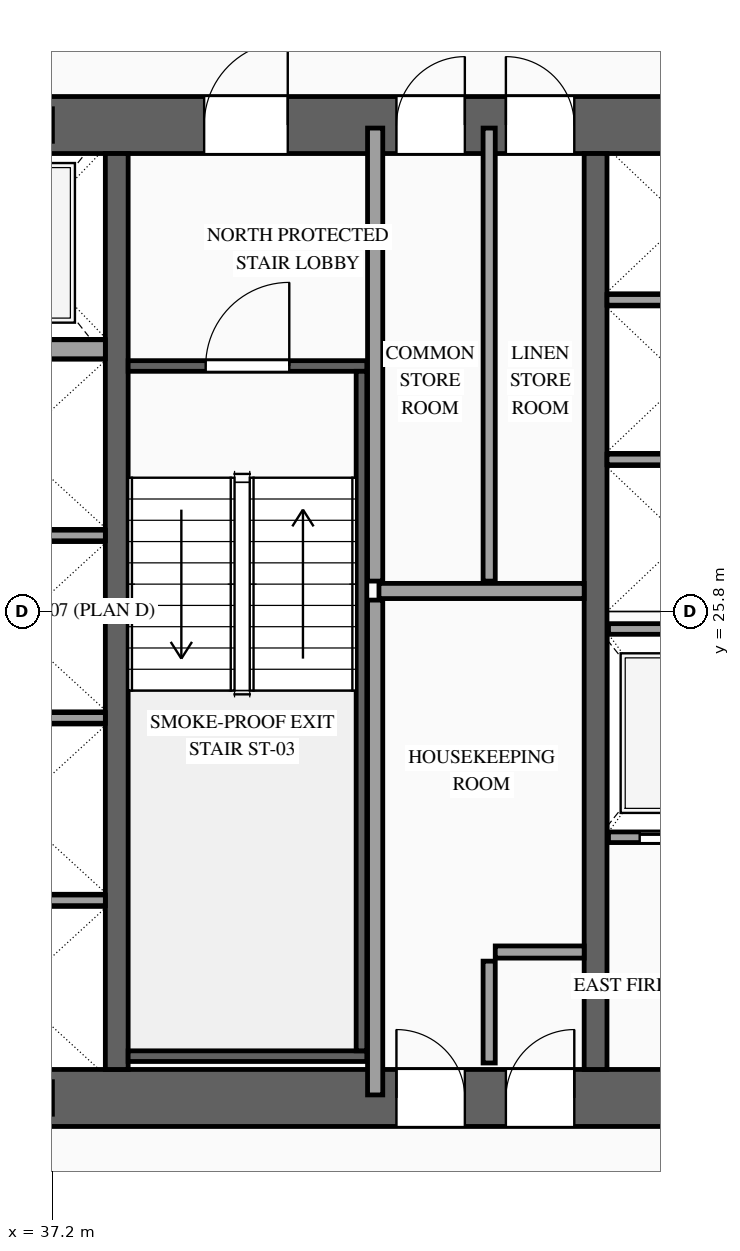
"""IFC4 building model, lengths in metres.
Left out: names, types, materials, properties, quantities, classifications, styles, units other than length and angle.
Written with IfcOpenShell. Run it as: python <this file> out.ifc"""

import sys

from ifc_helpers import new_model, si_unit, direction, frame, frame_2d, origin, origin_2d, place, context, subcontext, project, spatial, rectangle, i_section, extrude, source, transform, mapped, element, fill, save


model = new_model("IFC4")
c1 = context("Model", 3, precision=1e-05, world=origin(), true_north=direction((0.0, 1.0)))
c2 = subcontext(c1, "Body", "Model", "MODEL_VIEW")
j1 = project(units=[si_unit("LENGTHUNIT", "METRE"), si_unit("PLANEANGLEUNIT", "RADIAN")], contexts=[c1])
p1 = place(None, origin())
s1 = spatial("IfcSite", under=j1, at=p1, CompositionType="ELEMENT")
p2 = place(p1, origin())
s2 = spatial("IfcBuilding", under=s1, at=p2, CompositionType="ELEMENT")
p3 = place(p2, frame((0.0, 0.0, 111.8)))
s3 = spatial("IfcBuildingStorey", under=s2, at=p3, CompositionType="ELEMENT", Elevation=111.8)
p4 = place(p3, frame((23.425, 19.4, 0.0), z_axis=(0.0, 0.0, 1.0), x_axis=(1.0, 0.0, 0.0)))
e1 = element("IfcWall", 1, at=p4, inside=s3, PredefinedType="SHEAR", context=c2, shape_type="SweptSolid", body=[
    extrude(rectangle(XDim=27.15, YDim=0.75, at=frame_2d((13.575, 0.0))), origin(), (0.0, 0.0, 1.0), 3.6),
])
p5 = place(p4, frame((2.025, 0.0, 0.0)))
e2 = element("IfcOpeningElement", 2, at=p5, cuts=e1, PredefinedType="OPENING", context=c2, shape_type="SweptSolid", body=[
    extrude(rectangle(XDim=1.1, YDim=2.2, at=frame_2d((0.55, 1.1))), frame((0.0, 0.39, 0.0), z_axis=(0.0, -1.0, 0.0), x_axis=(1.0, 0.0, 0.0)), (0.0, 0.0, 1.0), 0.78),
])
p6 = place(p4, frame((9.925, 0.0, 0.0)))
e3 = element("IfcOpeningElement", 3, at=p6, cuts=e1, PredefinedType="OPENING", context=c2, shape_type="SweptSolid", body=[
    extrude(rectangle(XDim=1.1, YDim=2.2, at=frame_2d((0.55, 1.1))), frame((0.0, 0.39, 0.0), z_axis=(0.0, -1.0, 0.0), x_axis=(1.0, 0.0, 0.0)), (0.0, 0.0, 1.0), 0.78),
])
p7 = place(p4, frame((23.125, 0.0, 0.0)))
e4 = element("IfcOpeningElement", 4, at=p7, cuts=e1, PredefinedType="OPENING", context=c2, shape_type="SweptSolid", body=[
    extrude(rectangle(XDim=1.1, YDim=2.2, at=frame_2d((0.55, 1.1))), frame((0.0, 0.39, 0.0), z_axis=(0.0, -1.0, 0.0), x_axis=(1.0, 0.0, 0.0)), (0.0, 0.0, 1.0), 0.78),
])
p8 = place(p4, frame((19.745, 0.0, 0.0)))
e5 = element("IfcOpeningElement", 5, at=p8, cuts=e1, PredefinedType="OPENING", context=c2, shape_type="SweptSolid", body=[
    extrude(rectangle(XDim=0.9, YDim=2.15, at=frame_2d((0.45, 1.075))), frame((0.0, 0.39, 0.0), z_axis=(0.0, -1.0, 0.0), x_axis=(1.0, 0.0, 0.0)), (0.0, 0.0, 1.0), 0.78),
])
p9 = place(p4, frame((18.305, 0.0, 0.0)))
e6 = element("IfcOpeningElement", 6, at=p9, cuts=e1, PredefinedType="OPENING", context=c2, shape_type="SweptSolid", body=[
    extrude(rectangle(XDim=0.9, YDim=2.15, at=frame_2d((0.45, 1.075))), frame((0.0, 0.39, 0.0), z_axis=(0.0, -1.0, 0.0), x_axis=(1.0, 0.0, 0.0)), (0.0, 0.0, 1.0), 0.78),
])
p10 = place(p3, frame((23.425, 32.2, 0.0), z_axis=(0.0, 0.0, 1.0), x_axis=(1.0, 0.0, 0.0)))
e7 = element("IfcWall", 7, at=p10, inside=s3, PredefinedType="SHEAR", context=c2, shape_type="SweptSolid", body=[
    extrude(rectangle(XDim=27.15, YDim=0.75, at=frame_2d((13.575, 0.0))), origin(), (0.0, 0.0, 1.0), 3.6),
])
p11 = place(p10, frame((4.645, 0.0, 0.0)))
e8 = element("IfcOpeningElement", 8, at=p11, cuts=e7, PredefinedType="OPENING", context=c2, shape_type="SweptSolid", body=[
    extrude(rectangle(XDim=0.9, YDim=2.15, at=frame_2d((0.45, 1.075))), frame((0.0, 0.39, 0.0), z_axis=(0.0, -1.0, 0.0), x_axis=(1.0, 0.0, 0.0)), (0.0, 0.0, 1.0), 0.78),
])
p12 = place(p10, frame((9.925, 0.0, 0.0)))
e9 = element("IfcOpeningElement", 9, at=p12, cuts=e7, PredefinedType="OPENING", context=c2, shape_type="SweptSolid", body=[
    extrude(rectangle(XDim=1.1, YDim=2.2, at=frame_2d((0.55, 1.1))), frame((0.0, 0.39, 0.0), z_axis=(0.0, -1.0, 0.0), x_axis=(1.0, 0.0, 0.0)), (0.0, 0.0, 1.0), 0.78),
])
p13 = place(p10, frame((15.775, 0.0, 0.0)))
e10 = element("IfcOpeningElement", 10, at=p13, cuts=e7, PredefinedType="OPENING", context=c2, shape_type="SweptSolid", body=[
    extrude(rectangle(XDim=1.1, YDim=2.2, at=frame_2d((0.55, 1.1))), frame((0.0, 0.39, 0.0), z_axis=(0.0, -1.0, 0.0), x_axis=(1.0, 0.0, 0.0)), (0.0, 0.0, 1.0), 0.78),
])
p14 = place(p10, frame((18.305, 0.0, 0.0)))
e11 = element("IfcOpeningElement", 11, at=p14, cuts=e7, PredefinedType="OPENING", context=c2, shape_type="SweptSolid", body=[
    extrude(rectangle(XDim=0.9, YDim=2.15, at=frame_2d((0.45, 1.075))), frame((0.0, 0.39, 0.0), z_axis=(0.0, -1.0, 0.0), x_axis=(1.0, 0.0, 0.0)), (0.0, 0.0, 1.0), 0.78),
])
p15 = place(p10, frame((19.745, 0.0, 0.0)))
e12 = element("IfcOpeningElement", 12, at=p15, cuts=e7, PredefinedType="OPENING", context=c2, shape_type="SweptSolid", body=[
    extrude(rectangle(XDim=0.9, YDim=2.15, at=frame_2d((0.45, 1.075))), frame((0.0, 0.39, 0.0), z_axis=(0.0, -1.0, 0.0), x_axis=(1.0, 0.0, 0.0)), (0.0, 0.0, 1.0), 0.78),
])
m1 = source(origin(), c2, "Body", "SweptSolid", [
    extrude(rectangle(XDim=12.05, YDim=0.3, at=frame_2d((6.025, 0.0))), origin(), (0.0, 0.0, 1.0), 3.6),
])
for number, where, z_axis, x_axis in (
    (13, (38.05, 19.775, 0.0), (0.0, 0.0, 1.0), (0.0, 1.0, 0.0)),
    (14, (44.35, 19.775, 0.0), (0.0, 0.0, 1.0), (0.0, 1.0, 0.0)),
):
    element("IfcWall", number, at=place(p3, frame(where, z_axis=z_axis, x_axis=x_axis)), inside=s3, PredefinedType="SOLIDWALL", context=c2, shape_type="MappedRepresentation", body=[
        mapped(m1, transform((0.0, 0.0, 0.0), scale=1.0)),
    ])
m2 = source(origin(), c2, "Body", "SweptSolid", [
    extrude(i_section(OverallWidth=0.407, OverallDepth=0.428, WebThickness=0.02, FlangeThickness=0.035, at=origin_2d()), origin(), (0.0, 0.0, 1.0), 3.6),
])
for number, where, z_axis, x_axis in (
    (15, (37.0, 19.4, 0.0), (0.0, 0.0, 1.0), (1.0, 0.0, 0.0)),
    (16, (37.0, 32.2, 0.0), (0.0, 0.0, 1.0), (1.0, 0.0, 0.0)),
):
    element("IfcColumn", number, at=place(p3, frame(where, z_axis=z_axis, x_axis=x_axis)), inside=s3, PredefinedType="COLUMN", context=c2, shape_type="MappedRepresentation", body=[
        mapped(m2, transform((0.0, 0.0, 0.0), scale=1.0)),
    ])
p16 = place(p3, frame((44.52, 22.83, 0.0), z_axis=(0.0, 0.0, 1.0), x_axis=(1.0, 0.0, 0.0)))
e17 = element("IfcWall", 17, at=p16, inside=s3, PredefinedType="SOLIDWALL", context=c2, shape_type="SweptSolid", body=[
    extrude(rectangle(XDim=1.92, YDim=0.14, at=frame_2d((0.96, 0.0))), origin(), (0.0, 0.0, 1.0), 3.38),
])
p17 = place(p16, frame((0.41, 0.0, 0.0)))
e18 = element("IfcOpeningElement", 18, at=p17, cuts=e17, PredefinedType="OPENING", context=c2, shape_type="SweptSolid", body=[
    extrude(rectangle(XDim=1.1, YDim=2.2, at=frame_2d((0.55, 1.1))), frame((0.0, 0.085, 0.0), z_axis=(0.0, -1.0, 0.0), x_axis=(1.0, 0.0, 0.0)), (0.0, 0.0, 1.0), 0.17),
])
m3 = source(origin(), c2, "Body", "SweptSolid", [
    extrude(rectangle(XDim=1.92, YDim=0.14, at=frame_2d((0.96, 0.0))), origin(), (0.0, 0.0, 1.0), 3.38),
])
p18 = place(p3, frame((44.52, 25.57, 0.0), z_axis=(0.0, 0.0, 1.0), x_axis=(1.0, 0.0, 0.0)))
e19 = element("IfcWall", 19, at=p18, inside=s3, PredefinedType="SOLIDWALL", context=c2, shape_type="MappedRepresentation", body=[
    mapped(m3, transform((0.0, 0.0, 0.0), scale=1.0)),
])
m4 = source(origin(), c2, "Body", "SweptSolid", [
    extrude(rectangle(XDim=2.4, YDim=0.14, at=frame_2d((1.2, 0.0))), origin(), (0.0, 0.0, 1.0), 3.38),
])
for number, where, z_axis, x_axis in (
    (20, (35.5, 22.0, 0.0), (0.0, 0.0, 1.0), (1.0, 0.0, 0.0)),
    (21, (35.5, 24.4, 0.0), (0.0, 0.0, 1.0), (1.0, 0.0, 0.0)),
    (22, (35.5, 26.8, 0.0), (0.0, 0.0, 1.0), (1.0, 0.0, 0.0)),
):
    element("IfcWall", number, at=place(p3, frame(where, z_axis=z_axis, x_axis=x_axis)), inside=s3, PredefinedType="SOLIDWALL", context=c2, shape_type="MappedRepresentation", body=[
        mapped(m4, transform((0.0, 0.0, 0.0), scale=1.0)),
    ])
m5 = source(origin(), c2, "Body", "SweptSolid", [
    extrude(rectangle(XDim=2.4, YDim=0.25, at=frame_2d((1.2, 0.0))), origin(), (0.0, 0.0, 1.0), 3.38),
])
p19 = place(p3, frame((35.5, 29.25, 0.0), z_axis=(0.0, 0.0, 1.0), x_axis=(1.0, 0.0, 0.0)))
e23 = element("IfcWall", 23, at=p19, inside=s3, PredefinedType="SOLIDWALL", context=c2, shape_type="MappedRepresentation", body=[
    mapped(m5, transform((0.0, 0.0, 0.0), scale=1.0)),
])
m6 = source(origin(), c2, "Body", "SweptSolid", [
    extrude(rectangle(XDim=2.0, YDim=0.14, at=frame_2d((1.0, 0.0))), origin(), (0.0, 0.0, 1.0), 3.38),
])
for number, where, z_axis, x_axis in (
    (24, (44.5, 27.8, 0.0), (0.0, 0.0, 1.0), (1.0, 0.0, 0.0)),
    (25, (44.5, 29.9, 0.0), (0.0, 0.0, 1.0), (1.0, 0.0, 0.0)),
):
    element("IfcWall", number, at=place(p3, frame(where, z_axis=z_axis, x_axis=x_axis)), inside=s3, PredefinedType="SOLIDWALL", context=c2, shape_type="MappedRepresentation", body=[
        mapped(m6, transform((0.0, 0.0, 0.0), scale=1.0)),
    ])
p20 = place(p3, frame((38.2, 29.03, 0.0), z_axis=(0.0, 0.0, 1.0), x_axis=(1.0, 0.0, 0.0)))
e26 = element("IfcWall", 26, at=p20, inside=s3, PredefinedType="SOLIDWALL", context=c2, shape_type="SweptSolid", body=[
    extrude(rectangle(XDim=3.14, YDim=0.14, at=frame_2d((1.57, 0.0))), origin(), (0.0, 0.0, 1.0), 3.38),
])
p21 = place(p20, frame((1.02, 0.0, 0.0)))
e27 = element("IfcOpeningElement", 27, at=p21, cuts=e26, PredefinedType="OPENING", context=c2, shape_type="SweptSolid", body=[
    extrude(rectangle(XDim=1.1, YDim=2.2, at=frame_2d((0.55, 1.1))), frame((0.0, 0.085, 0.0), z_axis=(0.0, -1.0, 0.0), x_axis=(1.0, 0.0, 0.0)), (0.0, 0.0, 1.0), 0.17),
])
m7 = source(origin(), c2, "Body", "SweptSolid", [
    extrude(rectangle(XDim=3.14, YDim=0.14, at=frame_2d((1.57, 0.0))), origin(), (0.0, 0.0, 1.0), 3.38),
])
p22 = place(p3, frame((38.2, 19.95, 0.0), z_axis=(0.0, 0.0, 1.0), x_axis=(1.0, 0.0, 0.0)))
e28 = element("IfcWall", 28, at=p22, inside=s3, PredefinedType="SOLIDWALL", context=c2, shape_type="MappedRepresentation", body=[
    mapped(m7, transform((0.0, 0.0, 0.0), scale=1.0)),
])
m8 = source(origin(), c2, "Body", "SweptSolid", [
    extrude(rectangle(XDim=8.94, YDim=0.14, at=frame_2d((4.47, 0.0))), origin(), (0.0, 0.0, 1.0), 3.38),
])
p23 = place(p3, frame((41.27, 20.02, 0.0), z_axis=(0.0, 0.0, 1.0), x_axis=(0.0, 1.0, 0.0)))
e29 = element("IfcWall", 29, at=p23, inside=s3, PredefinedType="SOLIDWALL", context=c2, shape_type="MappedRepresentation", body=[
    mapped(m8, transform((0.0, 0.0, 0.0), scale=1.0)),
])
m9 = source(origin(), c2, "Body", "SweptSolid", [
    extrude(rectangle(XDim=1.34, YDim=0.16, at=frame_2d((0.67, 0.0))), origin(), (0.0, 0.0, 1.0), 3.38),
])
p24 = place(p3, frame((42.95, 19.86, 0.0), z_axis=(0.0, 0.0, 1.0), x_axis=(0.0, 1.0, 0.0)))
e30 = element("IfcWall", 30, at=p24, inside=s3, PredefinedType="PARTITIONING", context=c2, shape_type="MappedRepresentation", body=[
    mapped(m9, transform((0.0, 0.0, 0.0), scale=1.0)),
])
m10 = source(origin(), c2, "Body", "SweptSolid", [
    extrude(rectangle(XDim=1.17, YDim=0.16, at=frame_2d((0.585, 0.0))), origin(), (0.0, 0.0, 1.0), 3.38),
])
p25 = place(p3, frame((43.03, 21.32, 0.0), z_axis=(0.0, 0.0, 1.0), x_axis=(1.0, 0.0, 0.0)))
e31 = element("IfcWall", 31, at=p25, inside=s3, PredefinedType="PARTITIONING", context=c2, shape_type="MappedRepresentation", body=[
    mapped(m10, transform((0.0, 0.0, 0.0), scale=1.0)),
])
m11 = source(origin(), c2, "Body", "SweptSolid", [
    extrude(rectangle(XDim=6.51, YDim=0.2, at=frame_2d((3.255, 0.0))), origin(), (0.0, 0.0, 1.0), 3.38),
])
p26 = place(p3, frame((41.45, 19.44, 0.0), z_axis=(0.0, 0.0, 1.0), x_axis=(0.0, 1.0, 0.0)))
e32 = element("IfcWall", 32, at=p26, inside=s3, PredefinedType="PARTITIONING", context=c2, shape_type="MappedRepresentation", body=[
    mapped(m11, transform((0.0, 0.0, 0.0), scale=1.0)),
])
m12 = source(origin(), c2, "Body", "SweptSolid", [
    extrude(rectangle(XDim=2.7, YDim=0.2, at=frame_2d((1.35, 0.0))), origin(), (0.0, 0.0, 1.0), 3.38),
])
p27 = place(p3, frame((41.5, 26.07, 0.0), z_axis=(0.0, 0.0, 1.0), x_axis=(1.0, 0.0, 0.0)))
e33 = element("IfcWall", 33, at=p27, inside=s3, PredefinedType="PARTITIONING", context=c2, shape_type="MappedRepresentation", body=[
    mapped(m12, transform((0.0, 0.0, 0.0), scale=1.0)),
])
m13 = source(origin(), c2, "Body", "SweptSolid", [
    extrude(rectangle(XDim=5.96, YDim=0.2, at=frame_2d((2.98, 0.0))), origin(), (0.0, 0.0, 1.0), 3.38),
])
p28 = place(p3, frame((41.45, 26.2, 0.0), z_axis=(0.0, 0.0, 1.0), x_axis=(0.0, 1.0, 0.0)))
e34 = element("IfcWall", 34, at=p28, inside=s3, PredefinedType="PARTITIONING", context=c2, shape_type="MappedRepresentation", body=[
    mapped(m13, transform((0.0, 0.0, 0.0), scale=1.0)),
])
m14 = source(origin(), c2, "Body", "SweptSolid", [
    extrude(rectangle(XDim=5.96, YDim=0.16, at=frame_2d((2.98, 0.0))), origin(), (0.0, 0.0, 1.0), 3.38),
])
p29 = place(p3, frame((42.95, 26.2, 0.0), z_axis=(0.0, 0.0, 1.0), x_axis=(0.0, 1.0, 0.0)))
e35 = element("IfcWall", 35, at=p29, inside=s3, PredefinedType="PARTITIONING", context=c2, shape_type="MappedRepresentation", body=[
    mapped(m14, transform((0.0, 0.0, 0.0), scale=1.0)),
])
m15 = source(origin(), c2, "Body", "SweptSolid", [
    extrude(rectangle(XDim=1.1, YDim=2.2, at=frame_2d((0.55, 1.1))), frame((0.0, 0.025, 0.0), z_axis=(0.0, -1.0, 0.0), x_axis=(1.0, 0.0, 0.0)), (0.0, 0.0, 1.0), 0.05),
])
p30 = place(p17, origin())
e36 = element("IfcDoor", 36, at=p30, inside=s3, OperationType="SLIDING_TO_RIGHT", PredefinedType="DOOR", context=c2, shape_type="MappedRepresentation", body=[
    mapped(m15, transform((0.0, 0.0, 0.0), scale=1.0)),
])
fill(e18, e36)
m16 = source(origin(), c2, "Body", "SweptSolid", [
    extrude(rectangle(XDim=1.1, YDim=2.2, at=frame_2d((0.55, 1.1))), frame((0.0, 0.025, 0.0), z_axis=(0.0, -1.0, 0.0), x_axis=(1.0, 0.0, 0.0)), (0.0, 0.0, 1.0), 0.05),
])
p31 = place(p21, origin())
e37 = element("IfcDoor", 37, at=p31, inside=s3, OperationType="SINGLE_SWING_RIGHT", PredefinedType="DOOR", context=c2, shape_type="MappedRepresentation", body=[
    mapped(m16, transform((0.0, 0.0, 0.0), scale=1.0)),
])
fill(e27, e37)
p32 = place(p13, origin())
e38 = element("IfcDoor", 38, at=p32, inside=s3, OperationType="SINGLE_SWING_RIGHT", PredefinedType="DOOR", context=c2, shape_type="MappedRepresentation", body=[
    mapped(m16, transform((0.0, 0.0, 0.0), scale=1.0)),
])
fill(e10, e38)
m17 = source(origin(), c2, "Body", "SweptSolid", [
    extrude(rectangle(XDim=0.9, YDim=2.15, at=frame_2d((0.45, 1.075))), frame((0.0, 0.025, 0.0), z_axis=(0.0, -1.0, 0.0), x_axis=(1.0, 0.0, 0.0)), (0.0, 0.0, 1.0), 0.05),
])
p33 = place(p8, origin())
e39 = element("IfcDoor", 39, at=p33, inside=s3, OperationType="SINGLE_SWING_RIGHT", PredefinedType="DOOR", context=c2, shape_type="MappedRepresentation", body=[
    mapped(m17, transform((0.0, 0.0, 0.0), scale=1.0)),
])
fill(e5, e39)
p34 = place(p9, origin())
e40 = element("IfcDoor", 40, at=p34, inside=s3, OperationType="SINGLE_SWING_LEFT", PredefinedType="DOOR", context=c2, shape_type="MappedRepresentation", body=[
    mapped(m17, transform((0.0, 0.0, 0.0), scale=1.0)),
])
fill(e6, e40)
p35 = place(p14, origin())
e41 = element("IfcDoor", 41, at=p35, inside=s3, OperationType="SINGLE_SWING_RIGHT", PredefinedType="DOOR", context=c2, shape_type="MappedRepresentation", body=[
    mapped(m17, transform((0.0, 0.0, 0.0), scale=1.0)),
])
fill(e11, e41)
p36 = place(p15, origin())
e42 = element("IfcDoor", 42, at=p36, inside=s3, OperationType="SINGLE_SWING_LEFT", PredefinedType="DOOR", context=c2, shape_type="MappedRepresentation", body=[
    mapped(m17, transform((0.0, 0.0, 0.0), scale=1.0)),
])
fill(e12, e42)
save(model, sys.argv[1])
